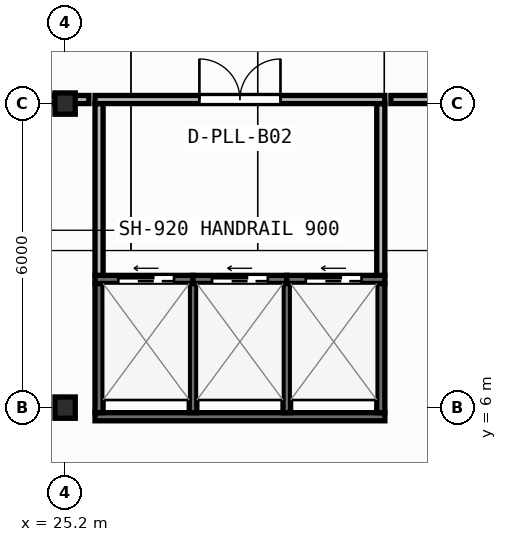
"""IFC4 building model, lengths in metres.
Left out: names, types, materials, properties, quantities, classifications, styles, units other than length and angle.
Written with IfcOpenShell. Run it as: python <this file> out.ifc"""

import sys

from ifc_helpers import new_model, si_unit, direction, frame, frame_2d, origin, origin_2d, place, context, subcontext, project, spatial, rectangle, i_section, extrude, element, fill, save


model = new_model("IFC4")
c1 = context("Model", 3, precision=1e-05, world=origin(), true_north=direction((0.0, 1.0)))
c2 = subcontext(c1, "Body", "Model", "MODEL_VIEW")
j1 = project(units=[si_unit("LENGTHUNIT", "METRE"), si_unit("PLANEANGLEUNIT", "RADIAN")], contexts=[c1])
p1 = place(None, origin())
s1 = spatial("IfcSite", under=j1, at=p1, CompositionType="ELEMENT")
p2 = place(p1, origin())
s2 = spatial("IfcBuilding", under=s1, at=p2, CompositionType="ELEMENT")
p3 = place(p2, frame((0.0, 0.0, -9.0)))
s3 = spatial("IfcBuildingStorey", under=s2, at=p3, CompositionType="ELEMENT", Elevation=-9.0)
for number, where, z_axis, x_axis in (
    (1, (25.2, 6.0, 0.0), (0.0, 0.0, 1.0), (1.0, 0.0, 0.0)),
    (2, (25.2, 12.0, 0.0), (0.0, 0.0, 1.0), (1.0, 0.0, 0.0)),
):
    element("IfcColumn", number, at=place(p3, frame(where, z_axis=z_axis, x_axis=x_axis)), inside=s3, PredefinedType="COLUMN", context=c2, shape_type="SweptSolid", body=[
        extrude(i_section(OverallWidth=0.4, OverallDepth=0.42, WebThickness=0.025, FlangeThickness=0.04, at=origin_2d()), origin(), (0.0, 0.0, 1.0), 4.5),
    ])
p4 = place(p3, frame((25.79, 5.82, 0.0), z_axis=(0.0, 0.0, 1.0), x_axis=(1.0, 0.0, 0.0)))
e3 = element("IfcWall", 3, at=p4, inside=s3, PredefinedType="SHEAR", context=c2, shape_type="SweptSolid", body=[
    extrude(rectangle(XDim=5.72, YDim=0.16, at=frame_2d((2.86, 0.0))), origin(), (0.0, 0.0, 1.0), 4.24),
])
for number, where, z_axis, x_axis in (
    (4, (25.87, 5.9, 0.0), (0.0, 0.0, 1.0), (0.0, 1.0, 0.0)),
    (5, (31.43, 5.9, 0.0), (0.0, 0.0, 1.0), (0.0, 1.0, 0.0)),
):
    element("IfcWall", number, at=place(p3, frame(where, z_axis=z_axis, x_axis=x_axis)), inside=s3, PredefinedType="SHEAR", context=c2, shape_type="SweptSolid", body=[
        extrude(rectangle(XDim=2.55, YDim=0.16, at=frame_2d((1.275, 0.0))), origin(), (0.0, 0.0, 1.0), 4.24),
    ])
for number, where, z_axis, x_axis in (
    (6, (27.725, 5.9, 0.0), (0.0, 0.0, 1.0), (0.0, 1.0, 0.0)),
    (7, (29.575, 5.9, 0.0), (0.0, 0.0, 1.0), (0.0, 1.0, 0.0)),
):
    element("IfcWall", number, at=place(p3, frame(where, z_axis=z_axis, x_axis=x_axis)), inside=s3, PredefinedType="SHEAR", context=c2, shape_type="SweptSolid", body=[
        extrude(rectangle(XDim=2.55, YDim=0.15, at=frame_2d((1.275, 0.0))), origin(), (0.0, 0.0, 1.0), 4.24),
    ])
p5 = place(p3, frame((25.79, 8.53, 0.0), z_axis=(0.0, 0.0, 1.0), x_axis=(1.0, 0.0, 0.0)))
e8 = element("IfcWall", 8, at=p5, inside=s3, PredefinedType="SHEAR", context=c2, shape_type="SweptSolid", body=[
    extrude(rectangle(XDim=1.935, YDim=0.16, at=frame_2d((0.968, 0.0))), origin(), (0.0, 0.0, 1.0), 4.24),
])
p6 = place(p5, frame((0.46, 0.0, 0.0)))
e9 = element("IfcOpeningElement", 9, at=p6, cuts=e8, PredefinedType="OPENING", context=c2, shape_type="SweptSolid", body=[
    extrude(rectangle(XDim=1.1, YDim=2.15, at=frame_2d((0.55, 1.075))), frame((0.0, 0.09, 0.0), z_axis=(0.0, -1.0, 0.0), x_axis=(1.0, 0.0, 0.0)), (0.0, 0.0, 1.0), 0.18),
])
p7 = place(p3, frame((27.725, 8.53, 0.0), z_axis=(0.0, 0.0, 1.0), x_axis=(1.0, 0.0, 0.0)))
e10 = element("IfcWall", 10, at=p7, inside=s3, PredefinedType="SHEAR", context=c2, shape_type="SweptSolid", body=[
    extrude(rectangle(XDim=1.85, YDim=0.16, at=frame_2d((0.925, 0.0))), origin(), (0.0, 0.0, 1.0), 4.24),
])
p8 = place(p7, frame((0.375, 0.0, 0.0)))
e11 = element("IfcOpeningElement", 11, at=p8, cuts=e10, PredefinedType="OPENING", context=c2, shape_type="SweptSolid", body=[
    extrude(rectangle(XDim=1.1, YDim=2.15, at=frame_2d((0.55, 1.075))), frame((0.0, 0.09, 0.0), z_axis=(0.0, -1.0, 0.0), x_axis=(1.0, 0.0, 0.0)), (0.0, 0.0, 1.0), 0.18),
])
p9 = place(p3, frame((29.575, 8.53, 0.0), z_axis=(0.0, 0.0, 1.0), x_axis=(1.0, 0.0, 0.0)))
e12 = element("IfcWall", 12, at=p9, inside=s3, PredefinedType="SHEAR", context=c2, shape_type="SweptSolid", body=[
    extrude(rectangle(XDim=1.935, YDim=0.16, at=frame_2d((0.968, 0.0))), origin(), (0.0, 0.0, 1.0), 4.24),
])
p10 = place(p9, frame((0.375, 0.0, 0.0)))
e13 = element("IfcOpeningElement", 13, at=p10, cuts=e12, PredefinedType="OPENING", context=c2, shape_type="SweptSolid", body=[
    extrude(rectangle(XDim=1.1, YDim=2.15, at=frame_2d((0.55, 1.075))), frame((0.0, 0.09, 0.0), z_axis=(0.0, -1.0, 0.0), x_axis=(1.0, 0.0, 0.0)), (0.0, 0.0, 1.0), 0.18),
])
for number, where, z_axis, x_axis in (
    (14, (25.87, 8.61, 0.0), (0.0, 0.0, 1.0), (0.0, 1.0, 0.0)),
    (15, (31.43, 8.61, 0.0), (0.0, 0.0, 1.0), (0.0, 1.0, 0.0)),
):
    element("IfcWall", number, at=place(p3, frame(where, z_axis=z_axis, x_axis=x_axis)), inside=s3, PredefinedType="PARTITIONING", context=c2, shape_type="SweptSolid", body=[
        extrude(rectangle(XDim=3.39, YDim=0.16, at=frame_2d((1.695, 0.0))), origin(), (0.0, 0.0, 1.0), 4.24),
    ])
p11 = place(p3, frame((25.79, 12.08, 0.0), z_axis=(0.0, 0.0, 1.0), x_axis=(1.0, 0.0, 0.0)))
e16 = element("IfcWall", 16, at=p11, inside=s3, PredefinedType="PARTITIONING", context=c2, shape_type="SweptSolid", body=[
    extrude(rectangle(XDim=5.72, YDim=0.16, at=frame_2d((2.86, 0.0))), origin(), (0.0, 0.0, 1.0), 3.305),
])
p12 = place(p11, frame((2.06, 0.0, 0.0)))
e17 = element("IfcOpeningElement", 17, at=p12, cuts=e16, PredefinedType="OPENING", context=c2, shape_type="SweptSolid", body=[
    extrude(rectangle(XDim=1.6, YDim=2.05, at=frame_2d((0.8, 1.025))), frame((0.0, 0.09, 0.0), z_axis=(0.0, -1.0, 0.0), x_axis=(1.0, 0.0, 0.0)), (0.0, 0.0, 1.0), 0.18),
])
p13 = place(p3, frame((24.02, 12.08, 0.0), z_axis=(0.0, 0.0, 1.0), x_axis=(1.0, 0.0, 0.0)))
e18 = element("IfcWall", 18, at=p13, inside=s3, PredefinedType="PARTITIONING", context=c2, shape_type="SweptSolid", body=[
    extrude(rectangle(XDim=1.65, YDim=0.16, at=frame_2d((0.825, 0.0))), origin(), (0.0, 0.0, 1.0), 3.305),
])
p14 = place(p3, frame((31.63, 12.08, 0.0), z_axis=(0.0, 0.0, 1.0), x_axis=(1.0, 0.0, 0.0)))
e19 = element("IfcWall", 19, at=p14, inside=s3, PredefinedType="PARTITIONING", context=c2, shape_type="SweptSolid", body=[
    extrude(rectangle(XDim=3.51, YDim=0.16, at=frame_2d((1.755, 0.0))), origin(), (0.0, 0.0, 1.0), 3.305),
])
p15 = place(p6, origin())
e20 = element("IfcDoor", 20, at=p15, inside=s3, OperationType="SLIDING_TO_LEFT", PredefinedType="DOOR", context=c2, shape_type="SweptSolid", body=[
    extrude(rectangle(XDim=1.1, YDim=2.15, at=frame_2d((0.55, 1.075))), frame((0.0, 0.025, 0.0), z_axis=(0.0, -1.0, 0.0), x_axis=(1.0, 0.0, 0.0)), (0.0, 0.0, 1.0), 0.05),
])
fill(e9, e20)
p16 = place(p8, origin())
e21 = element("IfcDoor", 21, at=p16, inside=s3, OperationType="SLIDING_TO_LEFT", PredefinedType="DOOR", context=c2, shape_type="SweptSolid", body=[
    extrude(rectangle(XDim=1.1, YDim=2.15, at=frame_2d((0.55, 1.075))), frame((0.0, 0.025, 0.0), z_axis=(0.0, -1.0, 0.0), x_axis=(1.0, 0.0, 0.0)), (0.0, 0.0, 1.0), 0.05),
])
fill(e11, e21)
p17 = place(p10, origin())
e22 = element("IfcDoor", 22, at=p17, inside=s3, OperationType="SLIDING_TO_LEFT", PredefinedType="DOOR", context=c2, shape_type="SweptSolid", body=[
    extrude(rectangle(XDim=1.1, YDim=2.15, at=frame_2d((0.55, 1.075))), frame((0.0, 0.025, 0.0), z_axis=(0.0, -1.0, 0.0), x_axis=(1.0, 0.0, 0.0)), (0.0, 0.0, 1.0), 0.05),
])
fill(e13, e22)
p18 = place(p12, origin())
e23 = element("IfcDoor", 23, at=p18, inside=s3, OperationType="DOUBLE_DOOR_SINGLE_SWING", PredefinedType="DOOR", context=c2, shape_type="SweptSolid", body=[
    extrude(rectangle(XDim=1.6, YDim=2.05, at=frame_2d((0.8, 1.025))), frame((0.0, 0.025, 0.0), z_axis=(0.0, -1.0, 0.0), x_axis=(1.0, 0.0, 0.0)), (0.0, 0.0, 1.0), 0.05),
])
fill(e17, e23)
save(model, sys.argv[1])
